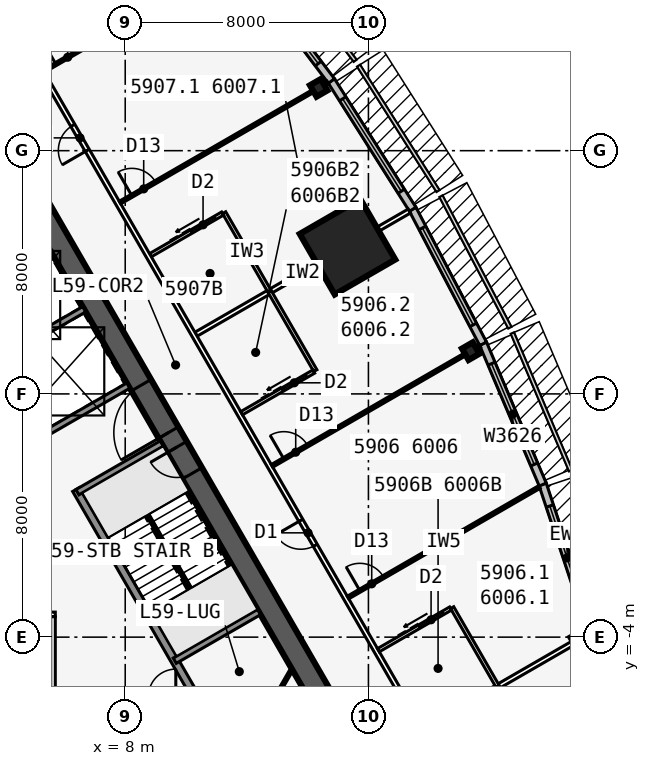
"""IFC4 building model, lengths in metres.
Left out: names, types, materials, properties, quantities, classifications, styles, units other than length and angle.
Written with IfcOpenShell. Run it as: python <this file> out.ifc"""

import sys

from ifc_helpers import new_model, si_unit, direction, frame, frame_2d, origin, origin_2d, place, context, subcontext, project, spatial, rectangle, i_section, extrude, element, fill, save


model = new_model("IFC4")
c1 = context("Model", 3, precision=1e-05, world=origin(), true_north=direction((0.0, 1.0)))
c2 = subcontext(c1, "Body", "Model", "MODEL_VIEW")
j1 = project(units=[si_unit("LENGTHUNIT", "METRE"), si_unit("PLANEANGLEUNIT", "RADIAN")], contexts=[c1])
p1 = place(None, origin())
s1 = spatial("IfcSite", under=j1, at=p1, CompositionType="ELEMENT")
p2 = place(p1, origin())
s2 = spatial("IfcBuilding", under=s1, at=p2, CompositionType="ELEMENT")
p3 = place(p2, frame((0.0, 0.0, 222.5)))
s3 = spatial("IfcBuildingStorey", under=s2, at=p3, CompositionType="ELEMENT", Elevation=222.5)
p4 = place(p3, frame((16.5, -9.526, 0.0), z_axis=(0.0, 0.0, 1.0), x_axis=(-0.499999749417, 0.866025548458, 0.0)))
e1 = element("IfcWall", 1, at=p4, inside=s3, PredefinedType="SHEAR", context=c2, shape_type="SweptSolid", body=[
    extrude(rectangle(XDim=33.0, YDim=0.75, at=frame_2d((16.5, 0.0))), origin(), (0.0, 0.0, 1.0), 3.6),
])
p5 = place(p4, frame((14.15, 0.0, 0.0)))
e2 = element("IfcOpeningElement", 2, at=p5, cuts=e1, PredefinedType="OPENING", context=c2, shape_type="SweptSolid", body=[
    extrude(rectangle(XDim=1.8, YDim=2.13, at=frame_2d((0.9, 1.065))), frame((0.0, 0.385, 0.0), z_axis=(0.0, -1.0, 0.0), x_axis=(1.0, 0.0, 0.0)), (0.0, 0.0, 1.0), 0.77),
])
p6 = place(p4, frame((12.6, 0.0, 0.0)))
e3 = element("IfcOpeningElement", 3, at=p6, cuts=e1, PredefinedType="OPENING", context=c2, shape_type="SweptSolid", body=[
    extrude(rectangle(XDim=1.0, YDim=2.13, at=frame_2d((0.5, 1.065))), frame((0.0, 0.385, 0.0), z_axis=(0.0, -1.0, 0.0), x_axis=(1.0, 0.0, 0.0)), (0.0, 0.0, 1.0), 0.77),
])
p7 = place(p3, frame((10.245, -5.843, 0.0), z_axis=(0.0, 0.0, 1.0), x_axis=(-0.499993009313, 0.866029439822, 0.0)))
e4 = element("IfcWall", 4, at=p7, inside=s3, PredefinedType="SOLIDWALL", context=c2, shape_type="SweptSolid", body=[
    extrude(rectangle(XDim=7.733, YDim=0.25, at=frame_2d((3.866, 0.0))), origin(), (0.0, 0.0, 1.0), 3.435),
])
for number, where, z_axis, x_axis in (
    (5, (9.629, -4.775, 0.0), (0.0, 0.0, 1.0), (0.866, 0.5, 0.0)),
    (6, (6.429, 0.767, 0.0), (0.0, 0.0, 1.0), (0.866, 0.5, 0.0)),
):
    element("IfcWall", number, at=place(p3, frame(where, z_axis=z_axis, x_axis=x_axis)), inside=s3, PredefinedType="SOLIDWALL", context=c2, shape_type="SweptSolid", body=[
        extrude(rectangle(XDim=3.2, YDim=0.2, at=frame_2d((1.6, 0.0))), origin(), (0.0, 0.0, 1.0), 3.435),
    ])
p8 = place(p3, frame((5.329, 2.673, 0.0), z_axis=(0.0, 0.0, 1.0), x_axis=(0.866022944154, 0.50000426018, 0.0)))
e7 = element("IfcWall", 7, at=p8, inside=s3, PredefinedType="SOLIDWALL", context=c2, shape_type="SweptSolid", body=[
    extrude(rectangle(XDim=3.2, YDim=0.2, at=frame_2d((1.6, 0.0))), origin(), (0.0, 0.0, 1.0), 3.435),
])
p9 = place(p3, frame((3.879, 5.184, 0.0), z_axis=(0.0, 0.0, 1.0), x_axis=(0.866042017984, 0.499971222258, 0.0)))
e8 = element("IfcWall", 8, at=p9, inside=s3, PredefinedType="SOLIDWALL", context=c2, shape_type="SweptSolid", body=[
    extrude(rectangle(XDim=3.2, YDim=0.2, at=frame_2d((1.6, 0.0))), origin(), (0.0, 0.0, 1.0), 3.435),
])
for number, where, z_axis, x_axis in (
    (9, (19.363, 5.406, 0.0), (0.0, 0.0, 1.0), (0.866, 0.5, 0.0)),
    (10, (14.363, 14.066, 0.0), (0.0, 0.0, 1.0), (0.866, 0.5, 0.0)),
):
    element("IfcColumn", number, at=place(p3, frame(where, z_axis=z_axis, x_axis=x_axis)), inside=s3, PredefinedType="COLUMN", context=c2, shape_type="SweptSolid", body=[
        extrude(i_section(OverallWidth=0.411, OverallDepth=0.434, WebThickness=0.036, FlangeThickness=0.057, at=origin_2d()), origin(), (0.0, 0.0, 1.0), 3.6),
    ])
p10 = place(p3, frame((15.312, 8.84, 0.0), z_axis=(0.0, 0.0, 1.0), x_axis=(0.866025403784, 0.5, 0.0)))
e11 = element("IfcColumn", 11, at=p10, inside=s3, PredefinedType="COLUMN", context=c2, shape_type="SweptSolid", body=[
    extrude(rectangle(XDim=2.3, YDim=2.3, at=origin_2d()), origin(), (0.0, 0.0, 1.0), 3.6),
])
p11 = place(p3, frame((23.338, -3.817, 0.0), z_axis=(0.0, 0.0, 1.0), x_axis=(-0.315108478109, 0.949055660656, 0.0)))
e12 = element("IfcWall", 12, at=p11, inside=s3, PredefinedType="STANDARD", context=c2, shape_type="SweptSolid", body=[
    extrude(rectangle(XDim=5.105, YDim=0.25, at=frame_2d((2.552, 0.0))), origin(), (0.0, 0.0, 1.0), 3.435),
])
p12 = place(p11, frame((0.752, 0.0, 0.45)))
e13 = element("IfcOpeningElement", 13, at=p12, cuts=e12, PredefinedType="OPENING", context=c2, shape_type="SweptSolid", body=[
    extrude(rectangle(XDim=3.6, YDim=2.6, at=frame_2d((1.8, 1.3))), frame((0.0, 0.135, 0.0), z_axis=(0.0, -1.0, 0.0), x_axis=(1.0, 0.0, 0.0)), (0.0, 0.0, 1.0), 0.27),
])
p13 = place(p3, frame((21.733, 1.018, 0.0), z_axis=(0.0, 0.0, 1.0), x_axis=(-0.390096809471, 0.920773848044, 0.0)))
e14 = element("IfcWall", 14, at=p13, inside=s3, PredefinedType="STANDARD", context=c2, shape_type="SweptSolid", body=[
    extrude(rectangle(XDim=5.038, YDim=0.25, at=frame_2d((2.519, 0.0))), origin(), (0.0, 0.0, 1.0), 3.435),
])
p14 = place(p13, frame((0.719, 0.0, 0.45)))
e15 = element("IfcOpeningElement", 15, at=p14, cuts=e14, PredefinedType="OPENING", context=c2, shape_type="SweptSolid", body=[
    extrude(rectangle(XDim=3.6, YDim=2.6, at=frame_2d((1.8, 1.3))), frame((0.0, 0.135, 0.0), z_axis=(0.0, -1.0, 0.0), x_axis=(1.0, 0.0, 0.0)), (0.0, 0.0, 1.0), 0.27),
])
p15 = place(p3, frame((19.772, 5.648, 0.0), z_axis=(0.0, 0.0, 1.0), x_axis=(-0.463976002579, 0.885847768542, 0.0)))
e16 = element("IfcWall", 16, at=p15, inside=s3, PredefinedType="STANDARD", context=c2, shape_type="SweptSolid", body=[
    extrude(rectangle(XDim=5.004, YDim=0.25, at=frame_2d((2.502, 0.0))), origin(), (0.0, 0.0, 1.0), 3.435),
])
p16 = place(p15, frame((0.702, 0.0, 0.45)))
e17 = element("IfcOpeningElement", 17, at=p16, cuts=e16, PredefinedType="OPENING", context=c2, shape_type="SweptSolid", body=[
    extrude(rectangle(XDim=3.6, YDim=2.6, at=frame_2d((1.8, 1.3))), frame((0.0, 0.135, 0.0), z_axis=(0.0, -1.0, 0.0), x_axis=(1.0, 0.0, 0.0)), (0.0, 0.0, 1.0), 0.27),
])
p17 = place(p3, frame((17.456, 10.072, 0.0), z_axis=(0.0, 0.0, 1.0), x_axis=(-0.535220361449, 0.844712474568, 0.0)))
e18 = element("IfcWall", 18, at=p17, inside=s3, PredefinedType="STANDARD", context=c2, shape_type="SweptSolid", body=[
    extrude(rectangle(XDim=5.004, YDim=0.25, at=frame_2d((2.502, 0.0))), origin(), (0.0, 0.0, 1.0), 3.435),
])
p18 = place(p17, frame((0.702, 0.0, 0.45)))
e19 = element("IfcOpeningElement", 19, at=p18, cuts=e18, PredefinedType="OPENING", context=c2, shape_type="SweptSolid", body=[
    extrude(rectangle(XDim=3.6, YDim=2.6, at=frame_2d((1.8, 1.3))), frame((0.0, 0.135, 0.0), z_axis=(0.0, -1.0, 0.0), x_axis=(1.0, 0.0, 0.0)), (0.0, 0.0, 1.0), 0.27),
])
p19 = place(p3, frame((14.783, 14.291, 0.0), z_axis=(0.0, 0.0, 1.0), x_axis=(-0.602408653511, 0.798187831388, 0.0)))
e20 = element("IfcWall", 20, at=p19, inside=s3, PredefinedType="STANDARD", context=c2, shape_type="SweptSolid", body=[
    extrude(rectangle(XDim=5.038, YDim=0.25, at=frame_2d((2.519, 0.0))), origin(), (0.0, 0.0, 1.0), 3.435),
])
p20 = place(p19, frame((0.719, 0.0, 0.45)))
e21 = element("IfcOpeningElement", 21, at=p20, cuts=e20, PredefinedType="OPENING", context=c2, shape_type="SweptSolid", body=[
    extrude(rectangle(XDim=3.6, YDim=2.6, at=frame_2d((1.8, 1.3))), frame((0.0, 0.135, 0.0), z_axis=(0.0, -1.0, 0.0), x_axis=(1.0, 0.0, 0.0)), (0.0, 0.0, 1.0), 0.27),
])
p21 = place(p3, frame((20.102, -11.115, 0.0), z_axis=(0.0, 0.0, 1.0), x_axis=(-0.500000265775, 0.866025250339, 0.0)))
e22 = element("IfcWall", 22, at=p21, inside=s3, PredefinedType="PARTITIONING", context=c2, shape_type="SweptSolid", body=[
    extrude(rectangle(XDim=39.354, YDim=0.15, at=frame_2d((19.677, 0.0))), origin(), (0.0, 0.0, 1.0), 3.435),
])
p22 = place(p21, frame((1.102, 0.0, 0.0)))
e23 = element("IfcOpeningElement", 23, at=p22, cuts=e22, PredefinedType="OPENING", context=c2, shape_type="SweptSolid", body=[
    extrude(rectangle(XDim=0.95, YDim=2.13, at=frame_2d((0.475, 1.065))), frame((0.0, 0.085, 0.0), z_axis=(0.0, -1.0, 0.0), x_axis=(1.0, 0.0, 0.0)), (0.0, 0.0, 1.0), 0.17),
])
p23 = place(p21, frame((11.702, 0.0, 0.0)))
e24 = element("IfcOpeningElement", 24, at=p23, cuts=e22, PredefinedType="OPENING", context=c2, shape_type="SweptSolid", body=[
    extrude(rectangle(XDim=0.95, YDim=2.13, at=frame_2d((0.475, 1.065))), frame((0.0, 0.085, 0.0), z_axis=(0.0, -1.0, 0.0), x_axis=(1.0, 0.0, 0.0)), (0.0, 0.0, 1.0), 0.17),
])
p24 = place(p21, frame((26.702, 0.0, 0.0)))
e25 = element("IfcOpeningElement", 25, at=p24, cuts=e22, PredefinedType="OPENING", context=c2, shape_type="SweptSolid", body=[
    extrude(rectangle(XDim=0.95, YDim=2.13, at=frame_2d((0.475, 1.065))), frame((0.0, 0.085, 0.0), z_axis=(0.0, -1.0, 0.0), x_axis=(1.0, 0.0, 0.0)), (0.0, 0.0, 1.0), 0.17),
])
p25 = place(p21, frame((37.302, 0.0, 0.0)))
e26 = element("IfcOpeningElement", 26, at=p25, cuts=e22, PredefinedType="OPENING", context=c2, shape_type="SweptSolid", body=[
    extrude(rectangle(XDim=0.95, YDim=2.13, at=frame_2d((0.475, 1.065))), frame((0.0, 0.085, 0.0), z_axis=(0.0, -1.0, 0.0), x_axis=(1.0, 0.0, 0.0)), (0.0, 0.0, 1.0), 0.17),
])
p26 = place(p3, frame((17.829, -7.027, 0.0), z_axis=(0.0, 0.0, 1.0), x_axis=(0.866026604282, 0.499997920671, 0.0)))
e27 = element("IfcWall", 27, at=p26, inside=s3, PredefinedType="PARTITIONING", context=c2, shape_type="SweptSolid", body=[
    extrude(rectangle(XDim=6.24, YDim=0.15, at=frame_2d((3.12, 0.0))), origin(), (0.0, 0.0, 1.0), 2.589),
])
p27 = place(p3, frame((15.329, -2.697, 0.0), z_axis=(0.0, 0.0, 1.0), x_axis=(0.866032413668, 0.499987858329, 0.0)))
e28 = element("IfcWall", 28, at=p27, inside=s3, PredefinedType="PARTITIONING", context=c2, shape_type="SweptSolid", body=[
    extrude(rectangle(XDim=7.273, YDim=0.1, at=frame_2d((3.636, 0.0))), origin(), (0.0, 0.0, 1.0), 2.589),
])
p28 = place(p27, frame((0.45, 0.0, 0.0)))
e29 = element("IfcOpeningElement", 29, at=p28, cuts=e28, PredefinedType="OPENING", context=c2, shape_type="SweptSolid", body=[
    extrude(rectangle(XDim=0.9, YDim=2.13, at=frame_2d((0.45, 1.065))), frame((0.0, 0.06, 0.0), z_axis=(0.0, -1.0, 0.0), x_axis=(1.0, 0.0, 0.0)), (0.0, 0.0, 1.0), 0.12),
])
p29 = place(p3, frame((12.829, 1.633, 0.0), z_axis=(0.0, 0.0, 1.0), x_axis=(0.866030558329, 0.49999107196, 0.0)))
e30 = element("IfcWall", 30, at=p29, inside=s3, PredefinedType="PARTITIONING", context=c2, shape_type="SweptSolid", body=[
    extrude(rectangle(XDim=7.894, YDim=0.1, at=frame_2d((3.947, 0.0))), origin(), (0.0, 0.0, 1.0), 2.589),
])
p30 = place(p29, frame((0.45, 0.0, 0.0)))
e31 = element("IfcOpeningElement", 31, at=p30, cuts=e30, PredefinedType="OPENING", context=c2, shape_type="SweptSolid", body=[
    extrude(rectangle(XDim=0.9, YDim=2.13, at=frame_2d((0.45, 1.065))), frame((0.0, 0.06, 0.0), z_axis=(0.0, -1.0, 0.0), x_axis=(1.0, 0.0, 0.0)), (0.0, 0.0, 1.0), 0.12),
])
p31 = place(p3, frame((10.329, 5.963, 0.0), z_axis=(0.0, 0.0, 1.0), x_axis=(0.866016460812, 0.500015489362, 0.0)))
e32 = element("IfcWall", 32, at=p31, inside=s3, PredefinedType="PARTITIONING", context=c2, shape_type="SweptSolid", body=[
    extrude(rectangle(XDim=8.101, YDim=0.15, at=frame_2d((4.051, 0.0))), origin(), (0.0, 0.0, 1.0), 2.589),
])
p32 = place(p3, frame((7.829, 10.293, 0.0), z_axis=(0.0, 0.0, 1.0), x_axis=(0.866030558329, 0.49999107196, 0.0)))
e33 = element("IfcWall", 33, at=p32, inside=s3, PredefinedType="PARTITIONING", context=c2, shape_type="SweptSolid", body=[
    extrude(rectangle(XDim=7.894, YDim=0.1, at=frame_2d((3.947, 0.0))), origin(), (0.0, 0.0, 1.0), 2.589),
])
p33 = place(p32, frame((0.45, 0.0, 0.0)))
e34 = element("IfcOpeningElement", 34, at=p33, cuts=e33, PredefinedType="OPENING", context=c2, shape_type="SweptSolid", body=[
    extrude(rectangle(XDim=0.9, YDim=2.13, at=frame_2d((0.45, 1.065))), frame((0.0, 0.06, 0.0), z_axis=(0.0, -1.0, 0.0), x_axis=(1.0, 0.0, 0.0)), (0.0, 0.0, 1.0), 0.12),
])
p34 = place(p3, frame((5.329, 14.623, 0.0), z_axis=(0.0, 0.0, 1.0), x_axis=(0.866017877653, 0.500013035415, 0.0)))
e35 = element("IfcWall", 35, at=p34, inside=s3, PredefinedType="PARTITIONING", context=c2, shape_type="SweptSolid", body=[
    extrude(rectangle(XDim=7.273, YDim=0.1, at=frame_2d((3.636, 0.0))), origin(), (0.0, 0.0, 1.0), 2.589),
])
p35 = place(p34, frame((0.45, 0.0, 0.0)))
e36 = element("IfcOpeningElement", 36, at=p35, cuts=e35, PredefinedType="OPENING", context=c2, shape_type="SweptSolid", body=[
    extrude(rectangle(XDim=0.9, YDim=2.13, at=frame_2d((0.45, 1.065))), frame((0.0, 0.06, 0.0), z_axis=(0.0, -1.0, 0.0), x_axis=(1.0, 0.0, 0.0)), (0.0, 0.0, 1.0), 0.12),
])
p36 = place(p3, frame((20.253, -5.627, 0.0), z_axis=(0.0, 0.0, 1.0), x_axis=(-0.50002537861, 0.866010750942, 0.0)))
e37 = element("IfcWall", 37, at=p36, inside=s3, PredefinedType="PLUMBINGWALL", context=c2, shape_type="SweptSolid", body=[
    extrude(rectangle(XDim=3.0, YDim=0.12, at=frame_2d((1.5, 0.0))), origin(), (0.0, 0.0, 1.0), 3.435),
])
p37 = place(p3, frame((16.329, -4.429, 0.0), z_axis=(0.0, 0.0, 1.0), x_axis=(0.865997131366, 0.500048966069, 0.0)))
e38 = element("IfcWall", 38, at=p37, inside=s3, PredefinedType="PLUMBINGWALL", context=c2, shape_type="SweptSolid", body=[
    extrude(rectangle(XDim=2.74, YDim=0.12, at=frame_2d((1.37, 0.0))), origin(), (0.0, 0.0, 1.0), 3.435),
])
p38 = place(p37, frame((1.55, 0.0, 0.0)))
e39 = element("IfcOpeningElement", 39, at=p38, cuts=e38, PredefinedType="OPENING", context=c2, shape_type="SweptSolid", body=[
    extrude(rectangle(XDim=0.9, YDim=2.13, at=frame_2d((0.45, 1.065))), frame((0.0, 0.07, 0.0), z_axis=(0.0, -1.0, 0.0), x_axis=(1.0, 0.0, 0.0)), (0.0, 0.0, 1.0), 0.14),
])
p39 = place(p3, frame((14.253, 4.765, 0.0), z_axis=(0.0, 0.0, 1.0), x_axis=(-0.50002537861, 0.866010750942, 0.0)))
e40 = element("IfcWall", 40, at=p39, inside=s3, PredefinedType="PLUMBINGWALL", context=c2, shape_type="SweptSolid", body=[
    extrude(rectangle(XDim=3.0, YDim=0.12, at=frame_2d((1.5, 0.0))), origin(), (0.0, 0.0, 1.0), 3.435),
])
p40 = place(p3, frame((11.829, 3.365, 0.0), z_axis=(0.0, 0.0, 1.0), x_axis=(0.865997131366, 0.500048966069, 0.0)))
e41 = element("IfcWall", 41, at=p40, inside=s3, PredefinedType="PLUMBINGWALL", context=c2, shape_type="SweptSolid", body=[
    extrude(rectangle(XDim=2.74, YDim=0.12, at=frame_2d((1.37, 0.0))), origin(), (0.0, 0.0, 1.0), 3.435),
])
p41 = place(p40, frame((1.55, 0.0, 0.0)))
e42 = element("IfcOpeningElement", 42, at=p41, cuts=e41, PredefinedType="OPENING", context=c2, shape_type="SweptSolid", body=[
    extrude(rectangle(XDim=0.9, YDim=2.13, at=frame_2d((0.45, 1.065))), frame((0.0, 0.07, 0.0), z_axis=(0.0, -1.0, 0.0), x_axis=(1.0, 0.0, 0.0)), (0.0, 0.0, 1.0), 0.14),
])
p42 = place(p3, frame((12.753, 7.363, 0.0), z_axis=(0.0, 0.0, 1.0), x_axis=(-0.499990139034, 0.866031096941, 0.0)))
e43 = element("IfcWall", 43, at=p42, inside=s3, PredefinedType="PLUMBINGWALL", context=c2, shape_type="SweptSolid", body=[
    extrude(rectangle(XDim=3.0, YDim=0.12, at=frame_2d((1.5, 0.0))), origin(), (0.0, 0.0, 1.0), 3.435),
])
p43 = place(p3, frame((8.829, 8.561, 0.0), z_axis=(0.0, 0.0, 1.0), x_axis=(0.866035715982, 0.499982138324, 0.0)))
e44 = element("IfcWall", 44, at=p43, inside=s3, PredefinedType="PLUMBINGWALL", context=c2, shape_type="SweptSolid", body=[
    extrude(rectangle(XDim=2.74, YDim=0.12, at=frame_2d((1.37, 0.0))), origin(), (0.0, 0.0, 1.0), 3.435),
])
p44 = place(p43, frame((1.55, 0.0, 0.0)))
e45 = element("IfcOpeningElement", 45, at=p44, cuts=e44, PredefinedType="OPENING", context=c2, shape_type="SweptSolid", body=[
    extrude(rectangle(XDim=0.9, YDim=2.13, at=frame_2d((0.45, 1.065))), frame((0.0, 0.07, 0.0), z_axis=(0.0, -1.0, 0.0), x_axis=(1.0, 0.0, 0.0)), (0.0, 0.0, 1.0), 0.14),
])
p45 = place(p3, frame((-2.65, -3.251, 0.0), z_axis=(0.0, 0.0, 1.0), x_axis=(1.0, 0.0, 0.0)))
e46 = element("IfcWall", 46, at=p45, inside=s3, PredefinedType="PARTITIONING", context=c2, shape_type="SweptSolid", body=[
    extrude(rectangle(XDim=8.35, YDim=0.15, at=frame_2d((4.175, 0.0))), origin(), (0.0, 0.0, 1.0), 3.435),
])
p46 = place(p3, frame((5.625, -5.826, 0.0), z_axis=(0.0, 0.0, 1.0), x_axis=(0.0, 1.0, 0.0)))
e47 = element("IfcWall", 47, at=p46, inside=s3, PredefinedType="PARTITIONING", context=c2, shape_type="SweptSolid", body=[
    extrude(rectangle(XDim=2.5, YDim=0.15, at=frame_2d((1.25, 0.0))), origin(), (0.0, 0.0, 1.0), 3.435),
])
p47 = place(p3, frame((13.483, -5.051, 0.0), z_axis=(0.0, 0.0, 1.0), x_axis=(-0.499999210213, -0.866025859768, 0.0)))
e48 = element("IfcWall", 48, at=p47, inside=s3, PredefinedType="PARTITIONING", context=c2, shape_type="SweptSolid", body=[
    extrude(rectangle(XDim=4.734, YDim=0.1, at=frame_2d((2.367, 0.0))), origin(), (0.0, 0.0, 1.0), 3.435),
])
p48 = place(p47, frame((0.734, 0.0, 0.0)))
e49 = element("IfcOpeningElement", 49, at=p48, cuts=e48, PredefinedType="OPENING", context=c2, shape_type="SweptSolid", body=[
    extrude(rectangle(XDim=0.9, YDim=2.13, at=frame_2d((0.45, 1.065))), frame((0.0, 0.06, 0.0), z_axis=(0.0, -1.0, 0.0), x_axis=(1.0, 0.0, 0.0)), (0.0, 0.0, 1.0), 0.12),
])
p49 = place(p3, frame((10.135, -2.401, 0.0), z_axis=(0.0, 0.0, 1.0), x_axis=(-0.499992232847, 0.866029888106, 0.0)))
e50 = element("IfcWall", 50, at=p49, inside=s3, PredefinedType="SOLIDWALL", context=c2, shape_type="SweptSolid", body=[
    extrude(rectangle(XDim=2.794, YDim=0.1, at=frame_2d((1.397, 0.0))), origin(), (0.0, 0.0, 1.0), 3.6),
])
p50 = place(p12, origin())
e51 = element("IfcWindow", 51, at=p50, inside=s3, PartitioningType="SINGLE_PANEL", PredefinedType="WINDOW", context=c2, shape_type="SweptSolid", body=[
    extrude(rectangle(XDim=3.6, YDim=2.6, at=frame_2d((1.8, 1.3))), frame((0.0, 0.03, 0.0), z_axis=(0.0, -1.0, 0.0), x_axis=(1.0, 0.0, 0.0)), (0.0, 0.0, 1.0), 0.06),
])
fill(e13, e51)
p51 = place(p14, origin())
e52 = element("IfcWindow", 52, at=p51, inside=s3, PartitioningType="SINGLE_PANEL", PredefinedType="WINDOW", context=c2, shape_type="SweptSolid", body=[
    extrude(rectangle(XDim=3.6, YDim=2.6, at=frame_2d((1.8, 1.3))), frame((0.0, 0.03, 0.0), z_axis=(0.0, -1.0, 0.0), x_axis=(1.0, 0.0, 0.0)), (0.0, 0.0, 1.0), 0.06),
])
fill(e15, e52)
p52 = place(p16, origin())
e53 = element("IfcWindow", 53, at=p52, inside=s3, PartitioningType="SINGLE_PANEL", PredefinedType="WINDOW", context=c2, shape_type="SweptSolid", body=[
    extrude(rectangle(XDim=3.6, YDim=2.6, at=frame_2d((1.8, 1.3))), frame((0.0, 0.03, 0.0), z_axis=(0.0, -1.0, 0.0), x_axis=(1.0, 0.0, 0.0)), (0.0, 0.0, 1.0), 0.06),
])
fill(e17, e53)
p53 = place(p18, origin())
e54 = element("IfcWindow", 54, at=p53, inside=s3, PartitioningType="SINGLE_PANEL", PredefinedType="WINDOW", context=c2, shape_type="SweptSolid", body=[
    extrude(rectangle(XDim=3.6, YDim=2.6, at=frame_2d((1.8, 1.3))), frame((0.0, 0.03, 0.0), z_axis=(0.0, -1.0, 0.0), x_axis=(1.0, 0.0, 0.0)), (0.0, 0.0, 1.0), 0.06),
])
fill(e19, e54)
p54 = place(p20, origin())
e55 = element("IfcWindow", 55, at=p54, inside=s3, PartitioningType="SINGLE_PANEL", PredefinedType="WINDOW", context=c2, shape_type="SweptSolid", body=[
    extrude(rectangle(XDim=3.6, YDim=2.6, at=frame_2d((1.8, 1.3))), frame((0.0, 0.03, 0.0), z_axis=(0.0, -1.0, 0.0), x_axis=(1.0, 0.0, 0.0)), (0.0, 0.0, 1.0), 0.06),
])
fill(e21, e55)
p55 = place(p28, origin())
e56 = element("IfcDoor", 56, at=p55, inside=s3, OperationType="SINGLE_SWING_LEFT", PredefinedType="DOOR", context=c2, shape_type="SweptSolid", body=[
    extrude(rectangle(XDim=0.9, YDim=2.13, at=frame_2d((0.45, 1.065))), frame((0.0, 0.025, 0.0), z_axis=(0.0, -1.0, 0.0), x_axis=(1.0, 0.0, 0.0)), (0.0, 0.0, 1.0), 0.05),
])
fill(e29, e56)
p56 = place(p30, origin())
e57 = element("IfcDoor", 57, at=p56, inside=s3, OperationType="SINGLE_SWING_LEFT", PredefinedType="DOOR", context=c2, shape_type="SweptSolid", body=[
    extrude(rectangle(XDim=0.9, YDim=2.13, at=frame_2d((0.45, 1.065))), frame((0.0, 0.025, 0.0), z_axis=(0.0, -1.0, 0.0), x_axis=(1.0, 0.0, 0.0)), (0.0, 0.0, 1.0), 0.05),
])
fill(e31, e57)
p57 = place(p33, origin())
e58 = element("IfcDoor", 58, at=p57, inside=s3, OperationType="SINGLE_SWING_LEFT", PredefinedType="DOOR", context=c2, shape_type="SweptSolid", body=[
    extrude(rectangle(XDim=0.9, YDim=2.13, at=frame_2d((0.45, 1.065))), frame((0.0, 0.025, 0.0), z_axis=(0.0, -1.0, 0.0), x_axis=(1.0, 0.0, 0.0)), (0.0, 0.0, 1.0), 0.05),
])
fill(e34, e58)
p58 = place(p35, origin())
e59 = element("IfcDoor", 59, at=p58, inside=s3, OperationType="SINGLE_SWING_LEFT", PredefinedType="DOOR", context=c2, shape_type="SweptSolid", body=[
    extrude(rectangle(XDim=0.9, YDim=2.13, at=frame_2d((0.45, 1.065))), frame((0.0, 0.025, 0.0), z_axis=(0.0, -1.0, 0.0), x_axis=(1.0, 0.0, 0.0)), (0.0, 0.0, 1.0), 0.05),
])
fill(e36, e59)
p59 = place(p38, origin())
e60 = element("IfcDoor", 60, at=p59, inside=s3, OperationType="SLIDING_TO_LEFT", PredefinedType="DOOR", context=c2, shape_type="SweptSolid", body=[
    extrude(rectangle(XDim=0.9, YDim=2.13, at=frame_2d((0.45, 1.065))), frame((0.0, 0.025, 0.0), z_axis=(0.0, -1.0, 0.0), x_axis=(1.0, 0.0, 0.0)), (0.0, 0.0, 1.0), 0.05),
])
fill(e39, e60)
p60 = place(p23, origin())
e61 = element("IfcDoor", 61, at=p60, inside=s3, OperationType="SINGLE_SWING_RIGHT", PredefinedType="DOOR", context=c2, shape_type="SweptSolid", body=[
    extrude(rectangle(XDim=0.95, YDim=2.13, at=frame_2d((0.475, 1.065))), frame((0.0, 0.025, 0.0), z_axis=(0.0, -1.0, 0.0), x_axis=(1.0, 0.0, 0.0)), (0.0, 0.0, 1.0), 0.05),
])
fill(e24, e61)
p61 = place(p41, origin())
e62 = element("IfcDoor", 62, at=p61, inside=s3, OperationType="SLIDING_TO_LEFT", PredefinedType="DOOR", context=c2, shape_type="SweptSolid", body=[
    extrude(rectangle(XDim=0.9, YDim=2.13, at=frame_2d((0.45, 1.065))), frame((0.0, 0.025, 0.0), z_axis=(0.0, -1.0, 0.0), x_axis=(1.0, 0.0, 0.0)), (0.0, 0.0, 1.0), 0.05),
])
fill(e42, e62)
p62 = place(p44, origin())
e63 = element("IfcDoor", 63, at=p62, inside=s3, OperationType="SLIDING_TO_LEFT", PredefinedType="DOOR", context=c2, shape_type="SweptSolid", body=[
    extrude(rectangle(XDim=0.9, YDim=2.13, at=frame_2d((0.45, 1.065))), frame((0.0, 0.025, 0.0), z_axis=(0.0, -1.0, 0.0), x_axis=(1.0, 0.0, 0.0)), (0.0, 0.0, 1.0), 0.05),
])
fill(e45, e63)
p63 = place(p24, origin())
e64 = element("IfcDoor", 64, at=p63, inside=s3, OperationType="SINGLE_SWING_LEFT", PredefinedType="DOOR", context=c2, shape_type="SweptSolid", body=[
    extrude(rectangle(XDim=0.95, YDim=2.13, at=frame_2d((0.475, 1.065))), frame((0.0, 0.025, 0.0), z_axis=(0.0, -1.0, 0.0), x_axis=(1.0, 0.0, 0.0)), (0.0, 0.0, 1.0), 0.05),
])
fill(e25, e64)
p64 = place(p5, origin())
e65 = element("IfcDoor", 65, at=p64, inside=s3, OperationType="DOUBLE_DOOR_SINGLE_SWING", PredefinedType="DOOR", context=c2, shape_type="SweptSolid", body=[
    extrude(rectangle(XDim=1.8, YDim=2.13, at=frame_2d((0.9, 1.065))), frame((0.0, 0.025, 0.0), z_axis=(0.0, -1.0, 0.0), x_axis=(1.0, 0.0, 0.0)), (0.0, 0.0, 1.0), 0.05),
])
fill(e2, e65)
p65 = place(p6, origin())
e66 = element("IfcDoor", 66, at=p65, inside=s3, OperationType="SINGLE_SWING_RIGHT", PredefinedType="DOOR", context=c2, shape_type="SweptSolid", body=[
    extrude(rectangle(XDim=1.0, YDim=2.13, at=frame_2d((0.5, 1.065))), frame((0.0, 0.025, 0.0), z_axis=(0.0, -1.0, 0.0), x_axis=(1.0, 0.0, 0.0)), (0.0, 0.0, 1.0), 0.05),
])
fill(e3, e66)
save(model, sys.argv[1])
